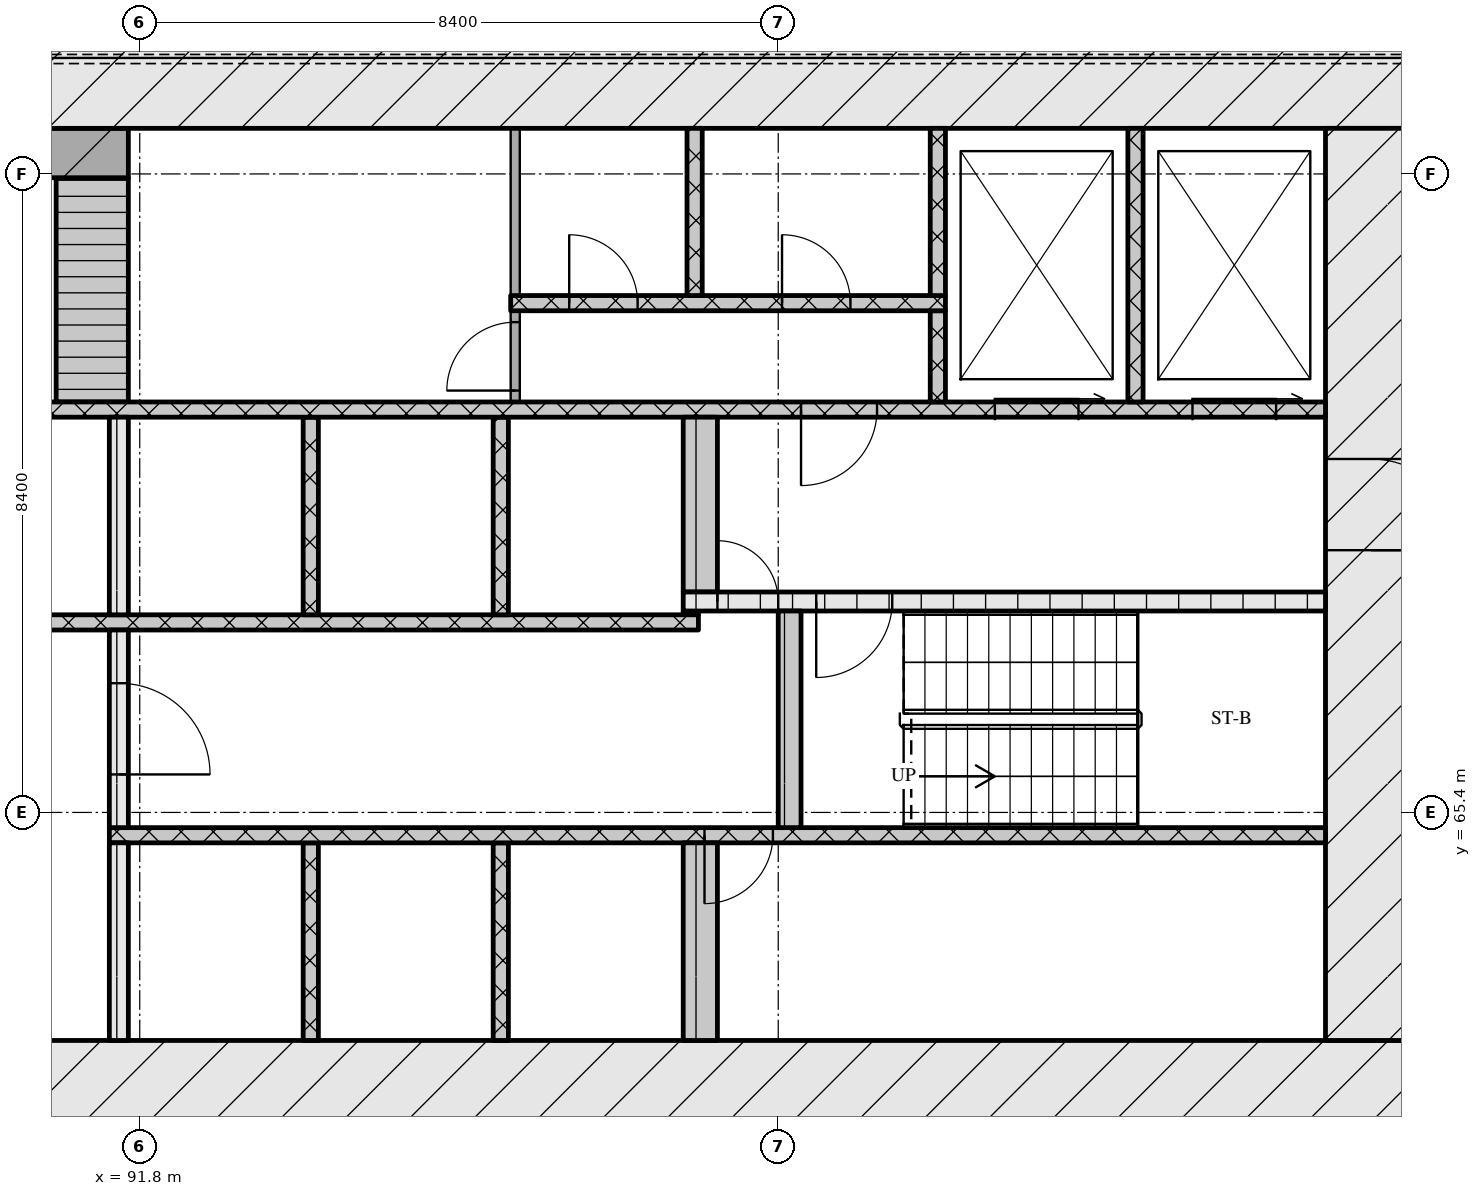
"""IFC4 building model, lengths in metres.
Left out: names, types, materials, properties, quantities, classifications, styles, units other than length and angle.
Written with IfcOpenShell. Run it as: python <this file> out.ifc"""

import sys

from ifc_helpers import new_model, si_unit, direction, frame, frame_2d, origin, place, context, subcontext, project, spatial, rectangle, extrude, element, fill, save


model = new_model("IFC4")
c1 = context("Model", 3, precision=1e-05, world=origin(), true_north=direction((0.0, 1.0)))
c2 = subcontext(c1, "Body", "Model", "MODEL_VIEW")
j1 = project(units=[si_unit("LENGTHUNIT", "METRE"), si_unit("PLANEANGLEUNIT", "RADIAN")], contexts=[c1])
p1 = place(None, origin())
s1 = spatial("IfcSite", under=j1, at=p1, CompositionType="ELEMENT")
p2 = place(p1, origin())
s2 = spatial("IfcBuilding", under=s1, at=p2, CompositionType="ELEMENT")
p3 = place(p2, frame((0.0, 0.0, 28.2)))
s3 = spatial("IfcBuildingStorey", under=s2, at=p3, CompositionType="ELEMENT", Elevation=28.2)
p4 = place(p3, frame((66.6, 61.8, 0.0), z_axis=(0.0, 0.0, 1.0), x_axis=(1.0, 0.0, 0.0)))
e1 = element("IfcWall", 1, at=p4, inside=s3, PredefinedType="SOLIDWALL", context=c2, shape_type="SweptSolid", body=[
    extrude(rectangle(XDim=42.0, YDim=1.2, at=frame_2d((21.0, 0.0))), origin(), (0.0, 0.0, 1.0), 4.2),
])
p5 = place(p4, frame((21.35, 0.0, 0.0)))
e2 = element("IfcOpeningElement", 2, at=p5, cuts=e1, PredefinedType="OPENING", context=c2, shape_type="SweptSolid", body=[
    extrude(rectangle(XDim=1.8, YDim=2.1, at=frame_2d((0.9, 1.05))), frame((0.0, 0.61, 0.0), z_axis=(0.0, -1.0, 0.0), x_axis=(1.0, 0.0, 0.0)), (0.0, 0.0, 1.0), 1.22),
])
p6 = place(p3, frame((66.6, 75.0, 0.0), z_axis=(0.0, 0.0, 1.0), x_axis=(1.0, 0.0, 0.0)))
e3 = element("IfcWall", 3, at=p6, inside=s3, PredefinedType="SOLIDWALL", context=c2, shape_type="SweptSolid", body=[
    extrude(rectangle(XDim=42.0, YDim=1.2, at=frame_2d((21.0, 0.0))), origin(), (0.0, 0.0, 1.0), 4.2),
])
p7 = place(p3, frame((108.0, 62.4, 0.0), z_axis=(0.0, 0.0, 1.0), x_axis=(0.0, 1.0, 0.0)))
e4 = element("IfcWall", 4, at=p7, inside=s3, PredefinedType="SOLIDWALL", context=c2, shape_type="SweptSolid", body=[
    extrude(rectangle(XDim=12.0, YDim=1.2, at=frame_2d((6.0, 0.0))), origin(), (0.0, 0.0, 1.0), 4.2),
])
p8 = place(p7, frame((6.45, 0.0, 0.0)))
e5 = element("IfcOpeningElement", 5, at=p8, cuts=e4, PredefinedType="OPENING", context=c2, shape_type="SweptSolid", body=[
    extrude(rectangle(XDim=1.2, YDim=2.1, at=frame_2d((0.6, 1.05))), frame((0.0, 0.61, 0.0), z_axis=(0.0, -1.0, 0.0), x_axis=(1.0, 0.0, 0.0)), (0.0, 0.0, 1.0), 1.22),
])
p9 = place(p3, frame((91.525, 62.4, 0.0), z_axis=(0.0, 0.0, 1.0), x_axis=(0.0, 1.0, 0.0)))
e6 = element("IfcWall", 6, at=p9, inside=s3, PredefinedType="SOLIDWALL", context=c2, shape_type="SweptSolid", body=[
    extrude(rectangle(XDim=2.6, YDim=0.25, at=frame_2d((1.3, 0.0))), origin(), (0.0, 0.0, 1.0), 4.2),
])
for number, where, z_axis, x_axis in (
    (7, (94.05, 62.4, 0.0), (0.0, 0.0, 1.0), (0.0, 1.0, 0.0)),
    (8, (96.55, 62.4, 0.0), (0.0, 0.0, 1.0), (0.0, 1.0, 0.0)),
):
    element("IfcWall", number, at=place(p3, frame(where, z_axis=z_axis, x_axis=x_axis)), inside=s3, PredefinedType="SOLIDWALL", context=c2, shape_type="SweptSolid", body=[
        extrude(rectangle(XDim=2.6, YDim=0.2, at=frame_2d((1.3, 0.0))), origin(), (0.0, 0.0, 1.0), 4.2),
    ])
p10 = place(p3, frame((99.175, 62.4, 0.0), z_axis=(0.0, 0.0, 1.0), x_axis=(0.0, 1.0, 0.0)))
e9 = element("IfcWall", 9, at=p10, inside=s3, PredefinedType="SOLIDWALL", context=c2, shape_type="SweptSolid", body=[
    extrude(rectangle(XDim=2.6, YDim=0.45, at=frame_2d((1.3, 0.0))), origin(), (0.0, 0.0, 1.0), 4.2),
])
p11 = place(p3, frame((91.4, 65.1, 0.0), z_axis=(0.0, 0.0, 1.0), x_axis=(1.0, 0.0, 0.0)))
e10 = element("IfcWall", 10, at=p11, inside=s3, PredefinedType="SOLIDWALL", context=c2, shape_type="SweptSolid", body=[
    extrude(rectangle(XDim=16.0, YDim=0.2, at=frame_2d((8.0, 0.0))), origin(), (0.0, 0.0, 1.0), 4.2),
])
p12 = place(p11, frame((7.83, 0.0, 0.0)))
e11 = element("IfcOpeningElement", 11, at=p12, cuts=e10, PredefinedType="OPENING", context=c2, shape_type="SweptSolid", body=[
    extrude(rectangle(XDim=0.9, YDim=2.1, at=frame_2d((0.45, 1.05))), frame((0.0, 0.11, 0.0), z_axis=(0.0, -1.0, 0.0), x_axis=(1.0, 0.0, 0.0)), (0.0, 0.0, 1.0), 0.22),
])
p13 = place(p3, frame((91.525, 65.2, 0.0), z_axis=(0.0, 0.0, 1.0), x_axis=(0.0, 1.0, 0.0)))
e12 = element("IfcWall", 12, at=p13, inside=s3, PredefinedType="SOLIDWALL", context=c2, shape_type="SweptSolid", body=[
    extrude(rectangle(XDim=2.6, YDim=0.25, at=frame_2d((1.3, 0.0))), origin(), (0.0, 0.0, 1.0), 4.2),
])
p14 = place(p13, frame((0.7, 0.0, 0.0)))
e13 = element("IfcOpeningElement", 13, at=p14, cuts=e12, PredefinedType="OPENING", context=c2, shape_type="SweptSolid", body=[
    extrude(rectangle(XDim=1.2, YDim=2.1, at=frame_2d((0.6, 1.05))), frame((0.0, 0.135, 0.0), z_axis=(0.0, -1.0, 0.0), x_axis=(1.0, 0.0, 0.0)), (0.0, 0.0, 1.0), 0.27),
])
p15 = place(p3, frame((100.35, 65.2, 0.0), z_axis=(0.0, 0.0, 1.0), x_axis=(0.0, 1.0, 0.0)))
e14 = element("IfcWall", 14, at=p15, inside=s3, PredefinedType="SOLIDWALL", context=c2, shape_type="SweptSolid", body=[
    extrude(rectangle(XDim=2.85, YDim=0.3, at=frame_2d((1.425, 0.0))), origin(), (0.0, 0.0, 1.0), 4.2),
])
p16 = place(p3, frame((76.05, 67.9, 0.0), z_axis=(0.0, 0.0, 1.0), x_axis=(1.0, 0.0, 0.0)))
e15 = element("IfcWall", 15, at=p16, inside=s3, PredefinedType="SOLIDWALL", context=c2, shape_type="SweptSolid", body=[
    extrude(rectangle(XDim=23.1, YDim=0.2, at=frame_2d((11.55, 0.0))), origin(), (0.0, 0.0, 1.0), 4.2),
])
p17 = place(p16, frame((8.35, 0.0, 0.0)))
e16 = element("IfcOpeningElement", 16, at=p17, cuts=e15, PredefinedType="OPENING", context=c2, shape_type="SweptSolid", body=[
    extrude(rectangle(XDim=1.1, YDim=2.1, at=frame_2d((0.55, 1.05))), frame((0.0, 0.11, 0.0), z_axis=(0.0, -1.0, 0.0), x_axis=(1.0, 0.0, 0.0)), (0.0, 0.0, 1.0), 0.22),
])
p18 = place(p16, frame((10.85, 0.0, 0.0)))
e17 = element("IfcOpeningElement", 17, at=p18, cuts=e15, PredefinedType="OPENING", context=c2, shape_type="SweptSolid", body=[
    extrude(rectangle(XDim=1.1, YDim=2.1, at=frame_2d((0.55, 1.05))), frame((0.0, 0.11, 0.0), z_axis=(0.0, -1.0, 0.0), x_axis=(1.0, 0.0, 0.0)), (0.0, 0.0, 1.0), 0.22),
])
p19 = place(p16, frame((13.55, 0.0, 0.0)))
e18 = element("IfcOpeningElement", 18, at=p19, cuts=e15, PredefinedType="OPENING", context=c2, shape_type="SweptSolid", body=[
    extrude(rectangle(XDim=1.0, YDim=2.1, at=frame_2d((0.5, 1.05))), frame((0.0, 0.11, 0.0), z_axis=(0.0, -1.0, 0.0), x_axis=(1.0, 0.0, 0.0)), (0.0, 0.0, 1.0), 0.22),
])
p20 = place(p3, frame((91.525, 68.0, 0.0), z_axis=(0.0, 0.0, 1.0), x_axis=(0.0, 1.0, 0.0)))
e19 = element("IfcWall", 19, at=p20, inside=s3, PredefinedType="SOLIDWALL", context=c2, shape_type="SweptSolid", body=[
    extrude(rectangle(XDim=2.6, YDim=0.25, at=frame_2d((1.3, 0.0))), origin(), (0.0, 0.0, 1.0), 4.2),
])
for number, where, z_axis, x_axis in (
    (20, (94.05, 68.0, 0.0), (0.0, 0.0, 1.0), (0.0, 1.0, 0.0)),
    (21, (96.55, 68.0, 0.0), (0.0, 0.0, 1.0), (0.0, 1.0, 0.0)),
):
    element("IfcWall", number, at=place(p3, frame(where, z_axis=z_axis, x_axis=x_axis)), inside=s3, PredefinedType="SOLIDWALL", context=c2, shape_type="SweptSolid", body=[
        extrude(rectangle(XDim=2.6, YDim=0.2, at=frame_2d((1.3, 0.0))), origin(), (0.0, 0.0, 1.0), 4.2),
    ])
p21 = place(p3, frame((98.95, 68.025, 0.0), z_axis=(0.0, 0.0, 1.0), x_axis=(1.0, 0.0, 0.0)))
e22 = element("IfcWall", 22, at=p21, inside=s3, PredefinedType="SOLIDWALL", context=c2, shape_type="SweptSolid", body=[
    extrude(rectangle(XDim=0.2, YDim=0.05, at=frame_2d((0.1, 0.0))), origin(), (0.0, 0.0, 1.0), 4.2),
])
p22 = place(p3, frame((98.95, 68.175, 0.0), z_axis=(0.0, 0.0, 1.0), x_axis=(1.0, 0.0, 0.0)))
e23 = element("IfcWall", 23, at=p22, inside=s3, PredefinedType="SOLIDWALL", context=c2, shape_type="SweptSolid", body=[
    extrude(rectangle(XDim=8.45, YDim=0.25, at=frame_2d((4.225, 0.0))), origin(), (0.0, 0.0, 1.0), 4.2),
])
p23 = place(p22, frame((0.45, 0.0, 0.0)))
e24 = element("IfcOpeningElement", 24, at=p23, cuts=e23, PredefinedType="OPENING", context=c2, shape_type="SweptSolid", body=[
    extrude(rectangle(XDim=0.8, YDim=2.1, at=frame_2d((0.4, 1.05))), frame((0.0, 0.135, 0.0), z_axis=(0.0, -1.0, 0.0), x_axis=(1.0, 0.0, 0.0)), (0.0, 0.0, 1.0), 0.27),
])
p24 = place(p22, frame((1.75, 0.0, 0.0)))
e25 = element("IfcOpeningElement", 25, at=p24, cuts=e23, PredefinedType="OPENING", context=c2, shape_type="SweptSolid", body=[
    extrude(rectangle(XDim=1.0, YDim=2.1, at=frame_2d((0.5, 1.05))), frame((0.0, 0.135, 0.0), z_axis=(0.0, -1.0, 0.0), x_axis=(1.0, 0.0, 0.0)), (0.0, 0.0, 1.0), 0.27),
])
p25 = place(p3, frame((99.175, 68.3, 0.0), z_axis=(0.0, 0.0, 1.0), x_axis=(0.0, 1.0, 0.0)))
e26 = element("IfcWall", 26, at=p25, inside=s3, PredefinedType="SOLIDWALL", context=c2, shape_type="SweptSolid", body=[
    extrude(rectangle(XDim=2.3, YDim=0.45, at=frame_2d((1.15, 0.0))), origin(), (0.0, 0.0, 1.0), 4.2),
])
p26 = place(p3, frame((67.8, 70.7, 0.0), z_axis=(0.0, 0.0, 1.0), x_axis=(1.0, 0.0, 0.0)))
e27 = element("IfcWall", 27, at=p26, inside=s3, PredefinedType="SOLIDWALL", context=c2, shape_type="SweptSolid", body=[
    extrude(rectangle(XDim=39.6, YDim=0.2, at=frame_2d((19.8, 0.0))), origin(), (0.0, 0.0, 1.0), 4.2),
])
p27 = place(p26, frame((0.65, 0.0, 0.0)))
e28 = element("IfcOpeningElement", 28, at=p27, cuts=e27, PredefinedType="OPENING", context=c2, shape_type="SweptSolid", body=[
    extrude(rectangle(XDim=1.1, YDim=2.1, at=frame_2d((0.55, 1.05))), frame((0.0, 0.11, 0.0), z_axis=(0.0, -1.0, 0.0), x_axis=(1.0, 0.0, 0.0)), (0.0, 0.0, 1.0), 0.22),
])
p28 = place(p26, frame((3.25, 0.0, 0.0)))
e29 = element("IfcOpeningElement", 29, at=p28, cuts=e27, PredefinedType="OPENING", context=c2, shape_type="SweptSolid", body=[
    extrude(rectangle(XDim=1.1, YDim=2.1, at=frame_2d((0.55, 1.05))), frame((0.0, 0.11, 0.0), z_axis=(0.0, -1.0, 0.0), x_axis=(1.0, 0.0, 0.0)), (0.0, 0.0, 1.0), 0.22),
])
p29 = place(p26, frame((5.9, 0.0, 0.0)))
e30 = element("IfcOpeningElement", 30, at=p29, cuts=e27, PredefinedType="OPENING", context=c2, shape_type="SweptSolid", body=[
    extrude(rectangle(XDim=1.0, YDim=2.1, at=frame_2d((0.5, 1.05))), frame((0.0, 0.11, 0.0), z_axis=(0.0, -1.0, 0.0), x_axis=(1.0, 0.0, 0.0)), (0.0, 0.0, 1.0), 0.22),
])
p30 = place(p26, frame((21.7, 0.0, 0.0)))
e31 = element("IfcOpeningElement", 31, at=p30, cuts=e27, PredefinedType="OPENING", context=c2, shape_type="SweptSolid", body=[
    extrude(rectangle(XDim=1.0, YDim=2.1, at=frame_2d((0.5, 1.05))), frame((0.0, 0.11, 0.0), z_axis=(0.0, -1.0, 0.0), x_axis=(1.0, 0.0, 0.0)), (0.0, 0.0, 1.0), 0.22),
])
p31 = place(p26, frame((32.7, 0.0, 0.0)))
e32 = element("IfcOpeningElement", 32, at=p31, cuts=e27, PredefinedType="OPENING", context=c2, shape_type="SweptSolid", body=[
    extrude(rectangle(XDim=1.0, YDim=2.1, at=frame_2d((0.5, 1.05))), frame((0.0, 0.11, 0.0), z_axis=(0.0, -1.0, 0.0), x_axis=(1.0, 0.0, 0.0)), (0.0, 0.0, 1.0), 0.22),
])
p32 = place(p26, frame((35.25, 0.0, 0.0)))
e33 = element("IfcOpeningElement", 33, at=p32, cuts=e27, PredefinedType="OPENING", context=c2, shape_type="SweptSolid", body=[
    extrude(rectangle(XDim=1.1, YDim=2.1, at=frame_2d((0.55, 1.05))), frame((0.0, 0.11, 0.0), z_axis=(0.0, -1.0, 0.0), x_axis=(1.0, 0.0, 0.0)), (0.0, 0.0, 1.0), 0.22),
])
p33 = place(p26, frame((37.85, 0.0, 0.0)))
e34 = element("IfcOpeningElement", 34, at=p33, cuts=e27, PredefinedType="OPENING", context=c2, shape_type="SweptSolid", body=[
    extrude(rectangle(XDim=1.1, YDim=2.1, at=frame_2d((0.55, 1.05))), frame((0.0, 0.11, 0.0), z_axis=(0.0, -1.0, 0.0), x_axis=(1.0, 0.0, 0.0)), (0.0, 0.0, 1.0), 0.22),
])
p34 = place(p3, frame((91.175, 70.8, 0.0), z_axis=(0.0, 0.0, 1.0), x_axis=(0.0, 1.0, 0.0)))
e35 = element("IfcWall", 35, at=p34, inside=s3, PredefinedType="SOLIDWALL", context=c2, shape_type="SweptSolid", body=[
    extrude(rectangle(XDim=2.95, YDim=0.95, at=frame_2d((1.475, 0.0))), origin(), (0.0, 0.0, 1.0), 4.2),
])
p35 = place(p3, frame((96.74, 70.8, 0.0), z_axis=(0.0, 0.0, 1.0), x_axis=(0.0, 1.0, 0.0)))
e36 = element("IfcWall", 36, at=p35, inside=s3, PredefinedType="PARTITIONING", context=c2, shape_type="SweptSolid", body=[
    extrude(rectangle(XDim=1.2, YDim=0.12, at=frame_2d((0.6, 0.0))), origin(), (0.0, 0.0, 1.0), 4.2),
])
p36 = place(p35, frame((0.15, 0.0, 0.0)))
e37 = element("IfcOpeningElement", 37, at=p36, cuts=e36, PredefinedType="OPENING", context=c2, shape_type="SweptSolid", body=[
    extrude(rectangle(XDim=0.9, YDim=2.1, at=frame_2d((0.45, 1.05))), frame((0.0, 0.07, 0.0), z_axis=(0.0, -1.0, 0.0), x_axis=(1.0, 0.0, 0.0)), (0.0, 0.0, 1.0), 0.14),
])
p37 = place(p3, frame((102.3, 70.8, 0.0), z_axis=(0.0, 0.0, 1.0), x_axis=(0.0, 1.0, 0.0)))
e38 = element("IfcWall", 38, at=p37, inside=s3, PredefinedType="SOLIDWALL", context=c2, shape_type="SweptSolid", body=[
    extrude(rectangle(XDim=1.2, YDim=0.2, at=frame_2d((0.6, 0.0))), origin(), (0.0, 0.0, 1.0), 4.2),
])
p38 = place(p3, frame((104.9, 70.8, 0.0), z_axis=(0.0, 0.0, 1.0), x_axis=(0.0, 1.0, 0.0)))
e39 = element("IfcWall", 39, at=p38, inside=s3, PredefinedType="SOLIDWALL", context=c2, shape_type="SweptSolid", body=[
    extrude(rectangle(XDim=3.6, YDim=0.2, at=frame_2d((1.8, 0.0))), origin(), (0.0, 0.0, 1.0), 4.2),
])
p39 = place(p3, frame((96.68, 72.1, 0.0), z_axis=(0.0, 0.0, 1.0), x_axis=(1.0, 0.0, 0.0)))
e40 = element("IfcWall", 40, at=p39, inside=s3, PredefinedType="SOLIDWALL", context=c2, shape_type="SweptSolid", body=[
    extrude(rectangle(XDim=5.72, YDim=0.2, at=frame_2d((2.86, 0.0))), origin(), (0.0, 0.0, 1.0), 4.2),
])
p40 = place(p39, frame((0.77, 0.0, 0.0)))
e41 = element("IfcOpeningElement", 41, at=p40, cuts=e40, PredefinedType="OPENING", context=c2, shape_type="SweptSolid", body=[
    extrude(rectangle(XDim=0.9, YDim=2.1, at=frame_2d((0.45, 1.05))), frame((0.0, 0.11, 0.0), z_axis=(0.0, -1.0, 0.0), x_axis=(1.0, 0.0, 0.0)), (0.0, 0.0, 1.0), 0.22),
])
p41 = place(p39, frame((3.57, 0.0, 0.0)))
e42 = element("IfcOpeningElement", 42, at=p41, cuts=e40, PredefinedType="OPENING", context=c2, shape_type="SweptSolid", body=[
    extrude(rectangle(XDim=0.9, YDim=2.1, at=frame_2d((0.45, 1.05))), frame((0.0, 0.11, 0.0), z_axis=(0.0, -1.0, 0.0), x_axis=(1.0, 0.0, 0.0)), (0.0, 0.0, 1.0), 0.22),
])
p42 = place(p3, frame((96.74, 72.2, 0.0), z_axis=(0.0, 0.0, 1.0), x_axis=(0.0, 1.0, 0.0)))
e43 = element("IfcWall", 43, at=p42, inside=s3, PredefinedType="PARTITIONING", context=c2, shape_type="SweptSolid", body=[
    extrude(rectangle(XDim=2.2, YDim=0.12, at=frame_2d((1.1, 0.0))), origin(), (0.0, 0.0, 1.0), 4.2),
])
for number, where, z_axis, x_axis in (
    (44, (99.1, 72.2, 0.0), (0.0, 0.0, 1.0), (0.0, 1.0, 0.0)),
    (45, (102.3, 72.2, 0.0), (0.0, 0.0, 1.0), (0.0, 1.0, 0.0)),
):
    element("IfcWall", number, at=place(p3, frame(where, z_axis=z_axis, x_axis=x_axis)), inside=s3, PredefinedType="SOLIDWALL", context=c2, shape_type="SweptSolid", body=[
        extrude(rectangle(XDim=2.2, YDim=0.2, at=frame_2d((1.1, 0.0))), origin(), (0.0, 0.0, 1.0), 4.2),
    ])
p43 = place(p3, frame((83.55, 74.075, 0.0), z_axis=(0.0, 0.0, 1.0), x_axis=(1.0, 0.0, 0.0)))
e46 = element("IfcWall", 46, at=p43, inside=s3, PredefinedType="SOLIDWALL", context=c2, shape_type="SweptSolid", body=[
    extrude(rectangle(XDim=8.1, YDim=0.65, at=frame_2d((4.05, 0.0))), origin(), (0.0, 0.0, 1.0), 4.2),
])
p44 = place(p12, origin())
e47 = element("IfcDoor", 47, at=p44, inside=s3, OperationType="SINGLE_SWING_RIGHT", PredefinedType="DOOR", context=c2, shape_type="SweptSolid", body=[
    extrude(rectangle(XDim=0.9, YDim=2.1, at=frame_2d((0.45, 1.05))), frame((0.0, 0.025, 0.0), z_axis=(0.0, -1.0, 0.0), x_axis=(1.0, 0.0, 0.0)), (0.0, 0.0, 1.0), 0.05),
])
fill(e11, e47)
p45 = place(p14, origin())
e48 = element("IfcDoor", 48, at=p45, inside=s3, OperationType="SINGLE_SWING_RIGHT", PredefinedType="DOOR", context=c2, shape_type="SweptSolid", body=[
    extrude(rectangle(XDim=1.2, YDim=2.1, at=frame_2d((0.6, 1.05))), frame((0.0, 0.025, 0.0), z_axis=(0.0, -1.0, 0.0), x_axis=(1.0, 0.0, 0.0)), (0.0, 0.0, 1.0), 0.05),
])
fill(e13, e48)
p46 = place(p23, origin())
e49 = element("IfcDoor", 49, at=p46, inside=s3, OperationType="SINGLE_SWING_LEFT", PredefinedType="DOOR", context=c2, shape_type="SweptSolid", body=[
    extrude(rectangle(XDim=0.8, YDim=2.1, at=frame_2d((0.4, 1.05))), frame((0.0, 0.025, 0.0), z_axis=(0.0, -1.0, 0.0), x_axis=(1.0, 0.0, 0.0)), (0.0, 0.0, 1.0), 0.05),
])
fill(e24, e49)
p47 = place(p24, origin())
e50 = element("IfcDoor", 50, at=p47, inside=s3, OperationType="SINGLE_SWING_RIGHT", PredefinedType="DOOR", context=c2, shape_type="SweptSolid", body=[
    extrude(rectangle(XDim=1.0, YDim=2.1, at=frame_2d((0.5, 1.05))), frame((0.0, 0.025, 0.0), z_axis=(0.0, -1.0, 0.0), x_axis=(1.0, 0.0, 0.0)), (0.0, 0.0, 1.0), 0.05),
])
fill(e25, e50)
p48 = place(p8, origin())
e51 = element("IfcDoor", 51, at=p48, inside=s3, OperationType="SINGLE_SWING_RIGHT", PredefinedType="DOOR", context=c2, shape_type="SweptSolid", body=[
    extrude(rectangle(XDim=1.2, YDim=2.1, at=frame_2d((0.6, 1.05))), frame((0.0, 0.025, 0.0), z_axis=(0.0, -1.0, 0.0), x_axis=(1.0, 0.0, 0.0)), (0.0, 0.0, 1.0), 0.05),
])
fill(e5, e51)
p49 = place(p31, origin())
e52 = element("IfcDoor", 52, at=p49, inside=s3, OperationType="SINGLE_SWING_RIGHT", PredefinedType="DOOR", context=c2, shape_type="SweptSolid", body=[
    extrude(rectangle(XDim=1.0, YDim=2.1, at=frame_2d((0.5, 1.05))), frame((0.0, 0.025, 0.0), z_axis=(0.0, -1.0, 0.0), x_axis=(1.0, 0.0, 0.0)), (0.0, 0.0, 1.0), 0.05),
])
fill(e32, e52)
p50 = place(p32, origin())
e53 = element("IfcDoor", 53, at=p50, inside=s3, OperationType="SLIDING_TO_RIGHT", PredefinedType="DOOR", context=c2, shape_type="SweptSolid", body=[
    extrude(rectangle(XDim=1.1, YDim=2.1, at=frame_2d((0.55, 1.05))), frame((0.0, 0.025, 0.0), z_axis=(0.0, -1.0, 0.0), x_axis=(1.0, 0.0, 0.0)), (0.0, 0.0, 1.0), 0.05),
])
fill(e33, e53)
p51 = place(p33, origin())
e54 = element("IfcDoor", 54, at=p51, inside=s3, OperationType="SLIDING_TO_RIGHT", PredefinedType="DOOR", context=c2, shape_type="SweptSolid", body=[
    extrude(rectangle(XDim=1.1, YDim=2.1, at=frame_2d((0.55, 1.05))), frame((0.0, 0.025, 0.0), z_axis=(0.0, -1.0, 0.0), x_axis=(1.0, 0.0, 0.0)), (0.0, 0.0, 1.0), 0.05),
])
fill(e34, e54)
p52 = place(p36, origin())
e55 = element("IfcDoor", 55, at=p52, inside=s3, OperationType="SINGLE_SWING_LEFT", PredefinedType="DOOR", context=c2, shape_type="SweptSolid", body=[
    extrude(rectangle(XDim=0.9, YDim=2.1, at=frame_2d((0.45, 1.05))), frame((0.0, 0.025, 0.0), z_axis=(0.0, -1.0, 0.0), x_axis=(1.0, 0.0, 0.0)), (0.0, 0.0, 1.0), 0.05),
])
fill(e37, e55)
p53 = place(p40, origin())
e56 = element("IfcDoor", 56, at=p53, inside=s3, OperationType="SINGLE_SWING_LEFT", PredefinedType="DOOR", context=c2, shape_type="SweptSolid", body=[
    extrude(rectangle(XDim=0.9, YDim=2.1, at=frame_2d((0.45, 1.05))), frame((0.0, 0.025, 0.0), z_axis=(0.0, -1.0, 0.0), x_axis=(1.0, 0.0, 0.0)), (0.0, 0.0, 1.0), 0.05),
])
fill(e41, e56)
p54 = place(p41, origin())
e57 = element("IfcDoor", 57, at=p54, inside=s3, OperationType="SINGLE_SWING_LEFT", PredefinedType="DOOR", context=c2, shape_type="SweptSolid", body=[
    extrude(rectangle(XDim=0.9, YDim=2.1, at=frame_2d((0.45, 1.05))), frame((0.0, 0.025, 0.0), z_axis=(0.0, -1.0, 0.0), x_axis=(1.0, 0.0, 0.0)), (0.0, 0.0, 1.0), 0.05),
])
fill(e42, e57)
save(model, sys.argv[1])
